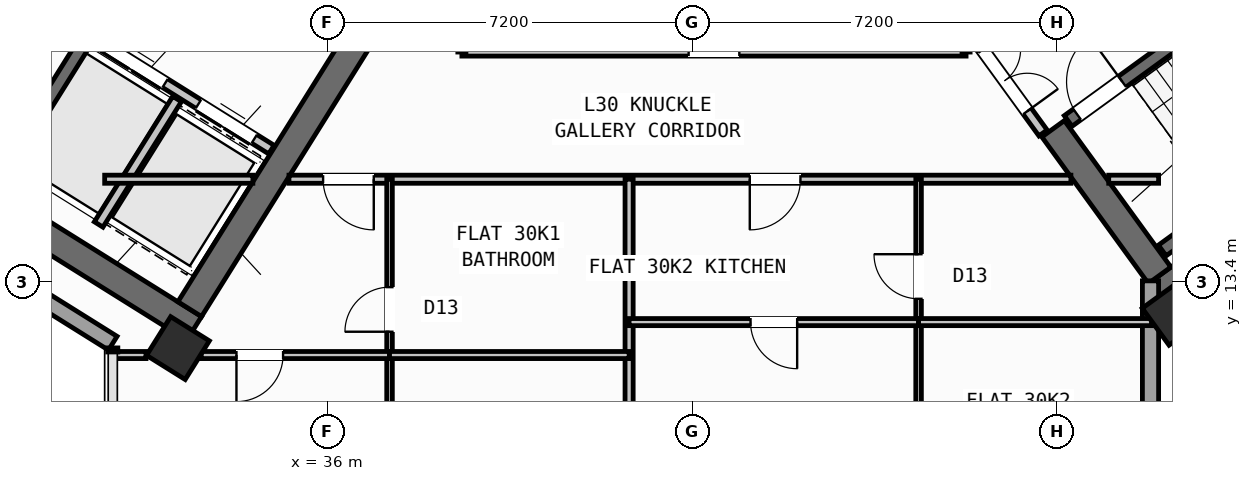
"""IFC4 building model, lengths in metres.
Left out: names, types, materials, properties, quantities, classifications, styles, units other than length and angle.
Written with IfcOpenShell. Run it as: python <this file> out.ifc"""

import sys

from ifc_helpers import new_model, si_unit, direction, frame, frame_2d, origin, origin_2d, place, context, subcontext, project, spatial, rectangle, hollow_rectangle, extrude, source, transform, mapped, element, fill, save


model = new_model("IFC4")
c1 = context("Model", 3, precision=1e-05, world=origin(), true_north=direction((0.0, 1.0)))
c2 = subcontext(c1, "Body", "Model", "MODEL_VIEW")
j1 = project(units=[si_unit("LENGTHUNIT", "METRE"), si_unit("PLANEANGLEUNIT", "RADIAN")], contexts=[c1])
p1 = place(None, origin())
s1 = spatial("IfcSite", under=j1, at=p1, CompositionType="ELEMENT")
p2 = place(p1, origin())
s2 = spatial("IfcBuilding", under=s1, at=p2, CompositionType="ELEMENT")
p3 = place(p2, frame((0.0, 0.0, 119.7)))
s3 = spatial("IfcBuildingStorey", under=s2, at=p3, CompositionType="ELEMENT", Elevation=119.7)
p4 = place(p3, frame((33.366, 12.477, 0.0), z_axis=(0.0, 0.0, 1.0), x_axis=(-0.848047359947, 0.529920442413, 0.0)))
e1 = element("IfcWall", 1, at=p4, inside=s3, PredefinedType="SHEAR", context=c2, shape_type="SweptSolid", body=[
    extrude(rectangle(XDim=13.14, YDim=0.55, at=frame_2d((6.57, 0.0))), origin(), (0.0, 0.0, 1.0), 3.35),
])
p5 = place(p3, frame((36.683, 18.304, 0.0), z_axis=(0.0, 0.0, 1.0), x_axis=(-0.529896466841, -0.848062341122, 0.0)))
e2 = element("IfcWall", 2, at=p5, inside=s3, PredefinedType="SHEAR", context=c2, shape_type="SweptSolid", body=[
    extrude(rectangle(XDim=6.425, YDim=0.55, at=frame_2d((3.212, 0.0))), origin(), (0.0, 0.0, 1.0), 3.35),
])
p6 = place(p3, frame((52.359, 13.14, 0.0), z_axis=(0.0, 0.0, 1.0), x_axis=(0.809014896919, 0.587788139183, 0.0)))
e3 = element("IfcWall", 3, at=p6, inside=s3, PredefinedType="SHEAR", context=c2, shape_type="SweptSolid", body=[
    extrude(rectangle(XDim=12.34, YDim=0.55, at=frame_2d((6.17, 0.0))), origin(), (0.0, 0.0, 1.0), 3.35),
])
p7 = place(p3, frame((52.42, 13.524, 0.0), z_axis=(0.0, 0.0, 1.0), x_axis=(-0.587802113096, 0.809004744015, 0.0)))
e4 = element("IfcWall", 4, at=p7, inside=s3, PredefinedType="SHEAR", context=c2, shape_type="SweptSolid", body=[
    extrude(rectangle(XDim=3.575, YDim=0.55, at=frame_2d((1.788, 0.0))), origin(), (0.0, 0.0, 1.0), 3.35),
])
m1 = source(origin(), c2, "Body", "SweptSolid", [
    extrude(hollow_rectangle(XDim=0.9, YDim=0.9, WallThickness=0.036, at=origin_2d()), origin(), (0.0, 0.0, 1.0), 3.6),
])
for number, where, z_axis, x_axis in (
    (5, (33.046, 12.087, 0.0), (0.0, 0.0, 1.0), (-0.848, 0.53, 0.0)),
    (6, (52.705, 12.773, 0.0), (0.0, 0.0, 1.0), (0.809, 0.588, 0.0)),
):
    element("IfcColumn", number, at=place(p3, frame(where, z_axis=z_axis, x_axis=x_axis)), inside=s3, PredefinedType="COLUMN", context=c2, shape_type="MappedRepresentation", body=[
        mapped(m1, transform((0.0, 0.0, 0.0), scale=1.0)),
    ])
p8 = place(p3, frame((31.76, 12.183, 0.0), z_axis=(0.0, 0.0, 1.0), x_axis=(-0.848047074256, 0.529920899612, 0.0)))
e7 = element("IfcWall", 7, at=p8, inside=s3, PredefinedType="STANDARD", context=c2, shape_type="SweptSolid", body=[
    extrude(rectangle(XDim=30.652, YDim=0.32, at=frame_2d((15.326, 0.0))), origin(), (0.0, 0.0, 1.0), 3.35),
])
p9 = place(p8, frame((15.153, 0.0, 0.0)))
e8 = element("IfcOpeningElement", 8, at=p9, cuts=e7, PredefinedType="OPENING", context=c2, shape_type="SweptSolid", body=[
    extrude(rectangle(XDim=1.2, YDim=2.15, at=frame_2d((0.6, 1.075))), frame((0.0, 0.17, 0.0), z_axis=(0.0, -1.0, 0.0), x_axis=(1.0, 0.0, 0.0)), (0.0, 0.0, 1.0), 0.34),
])
p10 = place(p8, frame((2.002, 0.0, 0.8)))
e9 = element("IfcOpeningElement", 9, at=p10, cuts=e7, PredefinedType="OPENING", context=c2, shape_type="SweptSolid", body=[
    extrude(rectangle(XDim=2.1, YDim=1.55, at=frame_2d((1.05, 0.775))), frame((0.0, 0.17, 0.0), z_axis=(0.0, -1.0, 0.0), x_axis=(1.0, 0.0, 0.0)), (0.0, 0.0, 1.0), 0.34),
])
p11 = place(p8, frame((7.206, 0.0, 0.8)))
e10 = element("IfcOpeningElement", 10, at=p11, cuts=e7, PredefinedType="OPENING", context=c2, shape_type="SweptSolid", body=[
    extrude(rectangle(XDim=2.1, YDim=1.55, at=frame_2d((1.05, 0.775))), frame((0.0, 0.17, 0.0), z_axis=(0.0, -1.0, 0.0), x_axis=(1.0, 0.0, 0.0)), (0.0, 0.0, 1.0), 0.34),
])
p12 = place(p8, frame((12.648, 0.0, 1.0)))
e11 = element("IfcOpeningElement", 11, at=p12, cuts=e7, PredefinedType="OPENING", context=c2, shape_type="SweptSolid", body=[
    extrude(rectangle(XDim=0.9, YDim=1.25, at=frame_2d((0.45, 0.625))), frame((0.0, 0.17, 0.0), z_axis=(0.0, -1.0, 0.0), x_axis=(1.0, 0.0, 0.0)), (0.0, 0.0, 1.0), 0.34),
])
p13 = place(p8, frame((19.458, 0.0, 0.95)))
e12 = element("IfcOpeningElement", 12, at=p13, cuts=e7, PredefinedType="OPENING", context=c2, shape_type="SweptSolid", body=[
    extrude(rectangle(XDim=1.2, YDim=1.4, at=frame_2d((0.6, 0.7))), frame((0.0, 0.17, 0.0), z_axis=(0.0, -1.0, 0.0), x_axis=(1.0, 0.0, 0.0)), (0.0, 0.0, 1.0), 0.34),
])
p14 = place(p8, frame((21.858, 0.0, 0.95)))
e13 = element("IfcOpeningElement", 13, at=p14, cuts=e7, PredefinedType="OPENING", context=c2, shape_type="SweptSolid", body=[
    extrude(rectangle(XDim=1.2, YDim=1.4, at=frame_2d((0.6, 0.7))), frame((0.0, 0.17, 0.0), z_axis=(0.0, -1.0, 0.0), x_axis=(1.0, 0.0, 0.0)), (0.0, 0.0, 1.0), 0.34),
])
p15 = place(p8, frame((27.266, 0.0, 0.8)))
e14 = element("IfcOpeningElement", 14, at=p15, cuts=e7, PredefinedType="OPENING", context=c2, shape_type="SweptSolid", body=[
    extrude(rectangle(XDim=2.1, YDim=1.55, at=frame_2d((1.05, 0.775))), frame((0.0, 0.17, 0.0), z_axis=(0.0, -1.0, 0.0), x_axis=(1.0, 0.0, 0.0)), (0.0, 0.0, 1.0), 0.34),
])
p16 = place(p3, frame((52.24, 13.414, 0.0), z_axis=(0.0, 0.0, 1.0), x_axis=(0.0, -1.0, 0.0)))
e15 = element("IfcWall", 15, at=p16, inside=s3, PredefinedType="STANDARD", context=c2, shape_type="SweptSolid", body=[
    extrude(rectangle(XDim=9.948, YDim=0.32, at=frame_2d((4.974, 0.0))), origin(), (0.0, 0.0, 1.0), 3.35),
])
p17 = place(p16, frame((2.46, 0.0, 0.8)))
e16 = element("IfcOpeningElement", 16, at=p17, cuts=e15, PredefinedType="OPENING", context=c2, shape_type="SweptSolid", body=[
    extrude(rectangle(XDim=2.1, YDim=1.55, at=frame_2d((1.05, 0.775))), frame((0.0, 0.17, 0.0), z_axis=(0.0, -1.0, 0.0), x_axis=(1.0, 0.0, 0.0)), (0.0, 0.0, 1.0), 0.34),
])
p18 = place(p16, frame((7.183, 0.0, 0.85)))
e17 = element("IfcOpeningElement", 17, at=p18, cuts=e15, PredefinedType="OPENING", context=c2, shape_type="SweptSolid", body=[
    extrude(rectangle(XDim=1.8, YDim=1.5, at=frame_2d((0.9, 0.75))), frame((0.0, 0.17, 0.0), z_axis=(0.0, -1.0, 0.0), x_axis=(1.0, 0.0, 0.0)), (0.0, 0.0, 1.0), 0.34),
])
p19 = place(p3, frame((31.288, 18.256, 0.0), z_axis=(0.0, 0.0, 1.0), x_axis=(-0.529943379326, -0.848033026897, 0.0)))
e18 = element("IfcWall", 18, at=p19, inside=s3, PredefinedType="SHEAR", context=c2, shape_type="SweptSolid", body=[
    extrude(rectangle(XDim=3.16, YDim=0.26, at=frame_2d((1.58, 0.0))), origin(), (0.0, 0.0, 1.0), 3.35),
])
p20 = place(p3, frame((34.891, 16.005, 0.0), z_axis=(0.0, 0.0, 1.0), x_axis=(-0.848062873452, 0.529895614884, 0.0)))
e19 = element("IfcWall", 19, at=p20, inside=s3, PredefinedType="STANDARD", context=c2, shape_type="SweptSolid", body=[
    extrude(rectangle(XDim=4.248, YDim=0.2, at=frame_2d((2.124, 0.0))), origin(), (0.0, 0.0, 1.0), 3.34),
])
p21 = place(p20, frame((0.398, 0.0, 0.0)))
e20 = element("IfcOpeningElement", 20, at=p21, cuts=e19, PredefinedType="OPENING", context=c2, shape_type="SweptSolid", body=[
    extrude(rectangle(XDim=1.3, YDim=2.2, at=frame_2d((0.65, 1.1))), frame((0.0, 0.11, 0.0), z_axis=(0.0, -1.0, 0.0), x_axis=(1.0, 0.0, 0.0)), (0.0, 0.0, 1.0), 0.22),
])
p22 = place(p20, frame((2.473, 0.0, 0.0)))
e21 = element("IfcOpeningElement", 21, at=p22, cuts=e19, PredefinedType="OPENING", context=c2, shape_type="SweptSolid", body=[
    extrude(rectangle(XDim=1.45, YDim=2.25, at=frame_2d((0.725, 1.125))), frame((0.0, 0.11, 0.0), z_axis=(0.0, -1.0, 0.0), x_axis=(1.0, 0.0, 0.0)), (0.0, 0.0, 1.0), 0.22),
])
p23 = place(p3, frame((33.029, 17.003, 0.0), z_axis=(0.0, 0.0, 1.0), x_axis=(-0.529916267533, -0.848049968695, 0.0)))
e22 = element("IfcWall", 22, at=p23, inside=s3, PredefinedType="STANDARD", context=c2, shape_type="SweptSolid", body=[
    extrude(rectangle(XDim=2.92, YDim=0.2, at=frame_2d((1.46, 0.0))), origin(), (0.0, 0.0, 1.0), 3.34),
])
p24 = place(p3, frame((52.472, 14.013, 0.0), z_axis=(0.0, 0.0, 1.0), x_axis=(0.809028366311, 0.587769599847, 0.0)))
e23 = element("IfcWall", 23, at=p24, inside=s3, PredefinedType="SHEAR", context=c2, shape_type="SweptSolid", body=[
    extrude(rectangle(XDim=7.33, YDim=0.26, at=frame_2d((3.665, 0.0))), origin(), (0.0, 0.0, 1.0), 3.35),
])
p25 = place(p3, frame((50.615, 16.57, 0.0), z_axis=(0.0, 0.0, 1.0), x_axis=(0.809028366311, 0.587769599847, 0.0)))
e24 = element("IfcWall", 24, at=p25, inside=s3, PredefinedType="SHEAR", context=c2, shape_type="SweptSolid", body=[
    extrude(rectangle(XDim=7.33, YDim=0.26, at=frame_2d((3.665, 0.0))), origin(), (0.0, 0.0, 1.0), 3.35),
])
p26 = place(p25, frame((0.22, 0.0, 0.0)))
e25 = element("IfcOpeningElement", 25, at=p26, cuts=e24, PredefinedType="OPENING", context=c2, shape_type="SweptSolid", body=[
    extrude(rectangle(XDim=1.1, YDim=2.1, at=frame_2d((0.55, 1.05))), frame((0.0, 0.14, 0.0), z_axis=(0.0, -1.0, 0.0), x_axis=(1.0, 0.0, 0.0)), (0.0, 0.0, 1.0), 0.28),
])
p27 = place(p3, frame((31.6, 15.42, 0.0), z_axis=(0.0, 0.0, 1.0), x_axis=(1.0, 0.0, 0.0)))
e26 = element("IfcWall", 26, at=p27, inside=s3, PredefinedType="PARTITIONING", context=c2, shape_type="SweptSolid", body=[
    extrude(rectangle(XDim=2.925, YDim=0.16, at=frame_2d((1.462, 0.0))), origin(), (0.0, 0.0, 1.0), 3.34),
])
p28 = place(p3, frame((35.237, 15.42, 0.0), z_axis=(0.0, 0.0, 1.0), x_axis=(1.0, 0.0, 0.0)))
e27 = element("IfcWall", 27, at=p28, inside=s3, PredefinedType="PARTITIONING", context=c2, shape_type="SweptSolid", body=[
    extrude(rectangle(XDim=15.432, YDim=0.16, at=frame_2d((7.716, 0.0))), origin(), (0.0, 0.0, 1.0), 3.34),
])
p29 = place(p28, frame((0.674, 0.0, 0.0)))
e28 = element("IfcOpeningElement", 28, at=p29, cuts=e27, PredefinedType="OPENING", context=c2, shape_type="SweptSolid", body=[
    extrude(rectangle(XDim=1.0, YDim=2.1, at=frame_2d((0.5, 1.05))), frame((0.0, 0.09, 0.0), z_axis=(0.0, -1.0, 0.0), x_axis=(1.0, 0.0, 0.0)), (0.0, 0.0, 1.0), 0.18),
])
p30 = place(p28, frame((9.094, 0.0, 0.0)))
e29 = element("IfcOpeningElement", 29, at=p30, cuts=e27, PredefinedType="OPENING", context=c2, shape_type="SweptSolid", body=[
    extrude(rectangle(XDim=1.0, YDim=2.1, at=frame_2d((0.5, 1.05))), frame((0.0, 0.09, 0.0), z_axis=(0.0, -1.0, 0.0), x_axis=(1.0, 0.0, 0.0)), (0.0, 0.0, 1.0), 0.18),
])
p31 = place(p3, frame((51.416, 15.42, 0.0), z_axis=(0.0, 0.0, 1.0), x_axis=(1.0, 0.0, 0.0)))
e30 = element("IfcWall", 30, at=p31, inside=s3, PredefinedType="PARTITIONING", context=c2, shape_type="SweptSolid", body=[
    extrude(rectangle(XDim=0.984, YDim=0.16, at=frame_2d((0.492, 0.0))), origin(), (0.0, 0.0, 1.0), 3.34),
])
p32 = place(p3, frame((38.65, 17.93, 0.0), z_axis=(0.0, 0.0, 1.0), x_axis=(1.0, 0.0, 0.0)))
e31 = element("IfcWall", 31, at=p32, inside=s3, PredefinedType="PARTITIONING", context=c2, shape_type="SweptSolid", body=[
    extrude(rectangle(XDim=9.95, YDim=0.16, at=frame_2d((4.975, 0.0))), origin(), (0.0, 0.0, 1.0), 3.34),
])
p33 = place(p32, frame((4.475, 0.0, 0.0)))
e32 = element("IfcOpeningElement", 32, at=p33, cuts=e31, PredefinedType="OPENING", context=c2, shape_type="SweptSolid", body=[
    extrude(rectangle(XDim=1.0, YDim=2.1, at=frame_2d((0.5, 1.05))), frame((0.0, 0.09, 0.0), z_axis=(0.0, -1.0, 0.0), x_axis=(1.0, 0.0, 0.0)), (0.0, 0.0, 1.0), 0.18),
])
p34 = place(p3, frame((50.119, 16.333, 0.0), z_axis=(0.0, 0.0, 1.0), x_axis=(-0.587749856981, 0.809042709391, 0.0)))
e33 = element("IfcWall", 33, at=p34, inside=s3, PredefinedType="STANDARD", context=c2, shape_type="SweptSolid", body=[
    extrude(rectangle(XDim=2.96, YDim=0.2, at=frame_2d((1.48, 0.0))), origin(), (0.0, 0.0, 1.0), 3.34),
])
p35 = place(p34, frame((0.53, 0.0, 0.0)))
e34 = element("IfcOpeningElement", 34, at=p35, cuts=e33, PredefinedType="OPENING", context=c2, shape_type="SweptSolid", body=[
    extrude(rectangle(XDim=1.5, YDim=2.15, at=frame_2d((0.75, 1.075))), frame((0.0, 0.11, 0.0), z_axis=(0.0, -1.0, 0.0), x_axis=(1.0, 0.0, 0.0)), (0.0, 0.0, 1.0), 0.22),
])
p36 = place(p3, frame((41.95, 1.96, 0.0), z_axis=(0.0, 0.0, 1.0), x_axis=(0.0, 1.0, 0.0)))
e35 = element("IfcWall", 35, at=p36, inside=s3, PredefinedType="PARTITIONING", context=c2, shape_type="SweptSolid", body=[
    extrude(rectangle(XDim=13.46, YDim=0.16, at=frame_2d((6.73, 0.0))), origin(), (0.0, 0.0, 1.0), 3.34),
])
p37 = place(p3, frame((37.222, 1.96, 0.0), z_axis=(0.0, 0.0, 1.0), x_axis=(0.0, 1.0, 0.0)))
e36 = element("IfcWall", 36, at=p37, inside=s3, PredefinedType="PARTITIONING", context=c2, shape_type="SweptSolid", body=[
    extrude(rectangle(XDim=13.46, YDim=0.11, at=frame_2d((6.73, 0.0))), origin(), (0.0, 0.0, 1.0), 3.34),
])
p38 = place(p37, frame((5.2, 0.0, 0.0)))
e37 = element("IfcOpeningElement", 37, at=p38, cuts=e36, PredefinedType="OPENING", context=c2, shape_type="SweptSolid", body=[
    extrude(rectangle(XDim=0.92, YDim=2.08, at=frame_2d((0.46, 1.04))), frame((0.0, 0.065, 0.0), z_axis=(0.0, -1.0, 0.0), x_axis=(1.0, 0.0, 0.0)), (0.0, 0.0, 1.0), 0.13),
])
p39 = place(p37, frame((10.45, 0.0, 0.0)))
e38 = element("IfcOpeningElement", 38, at=p39, cuts=e36, PredefinedType="OPENING", context=c2, shape_type="SweptSolid", body=[
    extrude(rectangle(XDim=0.88, YDim=2.08, at=frame_2d((0.44, 1.04))), frame((0.0, 0.065, 0.0), z_axis=(0.0, -1.0, 0.0), x_axis=(1.0, 0.0, 0.0)), (0.0, 0.0, 1.0), 0.13),
])
p40 = place(p3, frame((31.74, 11.95, 0.0), z_axis=(0.0, 0.0, 1.0), x_axis=(1.0, 0.0, 0.0)))
e39 = element("IfcWall", 39, at=p40, inside=s3, PredefinedType="PLUMBINGWALL", context=c2, shape_type="SweptSolid", body=[
    extrude(rectangle(XDim=0.676, YDim=0.14, at=frame_2d((0.338, 0.0))), origin(), (0.0, 0.0, 1.0), 3.34),
])
p41 = place(p3, frame((33.505, 11.95, 0.0), z_axis=(0.0, 0.0, 1.0), x_axis=(1.0, 0.0, 0.0)))
e40 = element("IfcWall", 40, at=p41, inside=s3, PredefinedType="PLUMBINGWALL", context=c2, shape_type="SweptSolid", body=[
    extrude(rectangle(XDim=3.717, YDim=0.14, at=frame_2d((1.858, 0.0))), origin(), (0.0, 0.0, 1.0), 2.525),
])
p42 = place(p41, frame((0.696, 0.0, 0.0)))
e41 = element("IfcOpeningElement", 41, at=p42, cuts=e40, PredefinedType="OPENING", context=c2, shape_type="SweptSolid", body=[
    extrude(rectangle(XDim=0.92, YDim=2.08, at=frame_2d((0.46, 1.04))), frame((0.0, 0.08, 0.0), z_axis=(0.0, -1.0, 0.0), x_axis=(1.0, 0.0, 0.0)), (0.0, 0.0, 1.0), 0.16),
])
p43 = place(p3, frame((37.222, 11.95, 0.0), z_axis=(0.0, 0.0, 1.0), x_axis=(1.0, 0.0, 0.0)))
e42 = element("IfcWall", 42, at=p43, inside=s3, PredefinedType="PLUMBINGWALL", context=c2, shape_type="SweptSolid", body=[
    extrude(rectangle(XDim=4.728, YDim=0.14, at=frame_2d((2.364, 0.0))), origin(), (0.0, 0.0, 1.0), 2.525),
])
p44 = place(p3, frame((47.663, 1.96, 0.0), z_axis=(0.0, 0.0, 1.0), x_axis=(0.0, 1.0, 0.0)))
e43 = element("IfcWall", 43, at=p44, inside=s3, PredefinedType="PARTITIONING", context=c2, shape_type="SweptSolid", body=[
    extrude(rectangle(XDim=13.46, YDim=0.11, at=frame_2d((6.73, 0.0))), origin(), (0.0, 0.0, 1.0), 3.34),
])
p45 = place(p44, frame((6.3, 0.0, 0.0)))
e44 = element("IfcOpeningElement", 44, at=p45, cuts=e43, PredefinedType="OPENING", context=c2, shape_type="SweptSolid", body=[
    extrude(rectangle(XDim=0.92, YDim=2.08, at=frame_2d((0.46, 1.04))), frame((0.0, 0.065, 0.0), z_axis=(0.0, -1.0, 0.0), x_axis=(1.0, 0.0, 0.0)), (0.0, 0.0, 1.0), 0.13),
])
p46 = place(p44, frame((11.1, 0.0, 0.0)))
e45 = element("IfcOpeningElement", 45, at=p46, cuts=e43, PredefinedType="OPENING", context=c2, shape_type="SweptSolid", body=[
    extrude(rectangle(XDim=0.88, YDim=2.08, at=frame_2d((0.44, 1.04))), frame((0.0, 0.065, 0.0), z_axis=(0.0, -1.0, 0.0), x_axis=(1.0, 0.0, 0.0)), (0.0, 0.0, 1.0), 0.13),
])
p47 = place(p3, frame((41.95, 12.6, 0.0), z_axis=(0.0, 0.0, 1.0), x_axis=(1.0, 0.0, 0.0)))
e46 = element("IfcWall", 46, at=p47, inside=s3, PredefinedType="PLUMBINGWALL", context=c2, shape_type="SweptSolid", body=[
    extrude(rectangle(XDim=5.713, YDim=0.14, at=frame_2d((2.856, 0.0))), origin(), (0.0, 0.0, 1.0), 2.525),
])
p48 = place(p47, frame((2.396, 0.0, 0.0)))
e47 = element("IfcOpeningElement", 47, at=p48, cuts=e46, PredefinedType="OPENING", context=c2, shape_type="SweptSolid", body=[
    extrude(rectangle(XDim=0.92, YDim=2.08, at=frame_2d((0.46, 1.04))), frame((0.0, 0.08, 0.0), z_axis=(0.0, -1.0, 0.0), x_axis=(1.0, 0.0, 0.0)), (0.0, 0.0, 1.0), 0.16),
])
p49 = place(p3, frame((47.663, 12.6, 0.0), z_axis=(0.0, 0.0, 1.0), x_axis=(1.0, 0.0, 0.0)))
e48 = element("IfcWall", 48, at=p49, inside=s3, PredefinedType="PLUMBINGWALL", context=c2, shape_type="SweptSolid", body=[
    extrude(rectangle(XDim=4.597, YDim=0.14, at=frame_2d((2.298, 0.0))), origin(), (0.0, 0.0, 1.0), 2.525),
])
m2 = source(origin(), c2, "Body", "SweptSolid", [
    extrude(rectangle(XDim=1.3, YDim=2.2, at=frame_2d((0.65, 1.1))), frame((0.0, 0.025, 0.0), z_axis=(0.0, -1.0, 0.0), x_axis=(1.0, 0.0, 0.0)), (0.0, 0.0, 1.0), 0.05),
])
p50 = place(p21, origin())
e49 = element("IfcDoor", 49, at=p50, inside=s3, OperationType="DOUBLE_DOOR_SLIDING", PredefinedType="DOOR", context=c2, shape_type="MappedRepresentation", body=[
    mapped(m2, transform((0.0, 0.0, 0.0), scale=1.0)),
])
fill(e20, e49)
m3 = source(origin(), c2, "Body", "SweptSolid", [
    extrude(rectangle(XDim=1.45, YDim=2.25, at=frame_2d((0.725, 1.125))), frame((0.0, 0.025, 0.0), z_axis=(0.0, -1.0, 0.0), x_axis=(1.0, 0.0, 0.0)), (0.0, 0.0, 1.0), 0.05),
])
p51 = place(p22, origin())
e50 = element("IfcDoor", 50, at=p51, inside=s3, OperationType="DOUBLE_DOOR_SLIDING", PredefinedType="DOOR", context=c2, shape_type="MappedRepresentation", body=[
    mapped(m3, transform((0.0, 0.0, 0.0), scale=1.0)),
])
fill(e21, e50)
m4 = source(origin(), c2, "Body", "SweptSolid", [
    extrude(rectangle(XDim=1.1, YDim=2.1, at=frame_2d((0.55, 1.05))), frame((0.0, 0.025, 0.0), z_axis=(0.0, -1.0, 0.0), x_axis=(1.0, 0.0, 0.0)), (0.0, 0.0, 1.0), 0.05),
])
p52 = place(p26, origin())
e51 = element("IfcDoor", 51, at=p52, inside=s3, OperationType="SINGLE_SWING_RIGHT", PredefinedType="DOOR", context=c2, shape_type="MappedRepresentation", body=[
    mapped(m4, transform((0.0, 0.0, 0.0), scale=1.0)),
])
fill(e25, e51)
m5 = source(origin(), c2, "Body", "SweptSolid", [
    extrude(rectangle(XDim=1.0, YDim=2.1, at=frame_2d((0.5, 1.05))), frame((0.0, 0.025, 0.0), z_axis=(0.0, -1.0, 0.0), x_axis=(1.0, 0.0, 0.0)), (0.0, 0.0, 1.0), 0.05),
])
p53 = place(p33, origin())
e52 = element("IfcDoor", 52, at=p53, inside=s3, OperationType="SINGLE_SWING_RIGHT", PredefinedType="DOOR", context=c2, shape_type="MappedRepresentation", body=[
    mapped(m5, transform((0.0, 0.0, 0.0), scale=1.0)),
])
fill(e32, e52)
m6 = source(origin(), c2, "Body", "SweptSolid", [
    extrude(rectangle(XDim=1.5, YDim=2.15, at=frame_2d((0.75, 1.075))), frame((0.0, 0.025, 0.0), z_axis=(0.0, -1.0, 0.0), x_axis=(1.0, 0.0, 0.0)), (0.0, 0.0, 1.0), 0.05),
])
p54 = place(p35, frame((1.5, 0.0, 0.0), z_axis=(0.0, 0.0, 1.0), x_axis=(-1.0, 0.0, 0.0)))
e53 = element("IfcDoor", 53, at=p54, inside=s3, OperationType="DOUBLE_DOOR_SINGLE_SWING", PredefinedType="DOOR", context=c2, shape_type="MappedRepresentation", body=[
    mapped(m6, transform((0.0, 0.0, 0.0), scale=1.0)),
])
fill(e34, e53)
p55 = place(p29, frame((1.0, 0.0, 0.0), z_axis=(0.0, 0.0, 1.0), x_axis=(-1.0, 0.0, 0.0)))
e54 = element("IfcDoor", 54, at=p55, inside=s3, OperationType="SINGLE_SWING_LEFT", PredefinedType="DOOR", context=c2, shape_type="MappedRepresentation", body=[
    mapped(m5, transform((0.0, 0.0, 0.0), scale=1.0)),
])
fill(e28, e54)
m7 = source(origin(), c2, "Body", "SweptSolid", [
    extrude(rectangle(XDim=0.92, YDim=2.08, at=frame_2d((0.46, 1.04))), frame((0.0, 0.025, 0.0), z_axis=(0.0, -1.0, 0.0), x_axis=(1.0, 0.0, 0.0)), (0.0, 0.0, 1.0), 0.05),
])
p56 = place(p42, frame((0.92, 0.0, 0.0), z_axis=(0.0, 0.0, 1.0), x_axis=(-1.0, 0.0, 0.0)))
e55 = element("IfcDoor", 55, at=p56, inside=s3, OperationType="SINGLE_SWING_RIGHT", PredefinedType="DOOR", context=c2, shape_type="MappedRepresentation", body=[
    mapped(m7, transform((0.0, 0.0, 0.0), scale=1.0)),
])
fill(e41, e55)
m8 = source(origin(), c2, "Body", "SweptSolid", [
    extrude(rectangle(XDim=0.88, YDim=2.08, at=frame_2d((0.44, 1.04))), frame((0.0, 0.025, 0.0), z_axis=(0.0, -1.0, 0.0), x_axis=(1.0, 0.0, 0.0)), (0.0, 0.0, 1.0), 0.05),
])
p57 = place(p39, origin())
e56 = element("IfcDoor", 56, at=p57, inside=s3, OperationType="SINGLE_SWING_LEFT", PredefinedType="DOOR", context=c2, shape_type="MappedRepresentation", body=[
    mapped(m8, transform((0.0, 0.0, 0.0), scale=1.0)),
])
fill(e38, e56)
p58 = place(p30, frame((1.0, 0.0, 0.0), z_axis=(0.0, 0.0, 1.0), x_axis=(-1.0, 0.0, 0.0)))
e57 = element("IfcDoor", 57, at=p58, inside=s3, OperationType="SINGLE_SWING_RIGHT", PredefinedType="DOOR", context=c2, shape_type="MappedRepresentation", body=[
    mapped(m5, transform((0.0, 0.0, 0.0), scale=1.0)),
])
fill(e29, e57)
p59 = place(p48, frame((0.92, 0.0, 0.0), z_axis=(0.0, 0.0, 1.0), x_axis=(-1.0, 0.0, 0.0)))
e58 = element("IfcDoor", 58, at=p59, inside=s3, OperationType="SINGLE_SWING_LEFT", PredefinedType="DOOR", context=c2, shape_type="MappedRepresentation", body=[
    mapped(m7, transform((0.0, 0.0, 0.0), scale=1.0)),
])
fill(e47, e58)
p60 = place(p46, origin())
e59 = element("IfcDoor", 59, at=p60, inside=s3, OperationType="SINGLE_SWING_RIGHT", PredefinedType="DOOR", context=c2, shape_type="MappedRepresentation", body=[
    mapped(m8, transform((0.0, 0.0, 0.0), scale=1.0)),
])
fill(e45, e59)
save(model, sys.argv[1])
